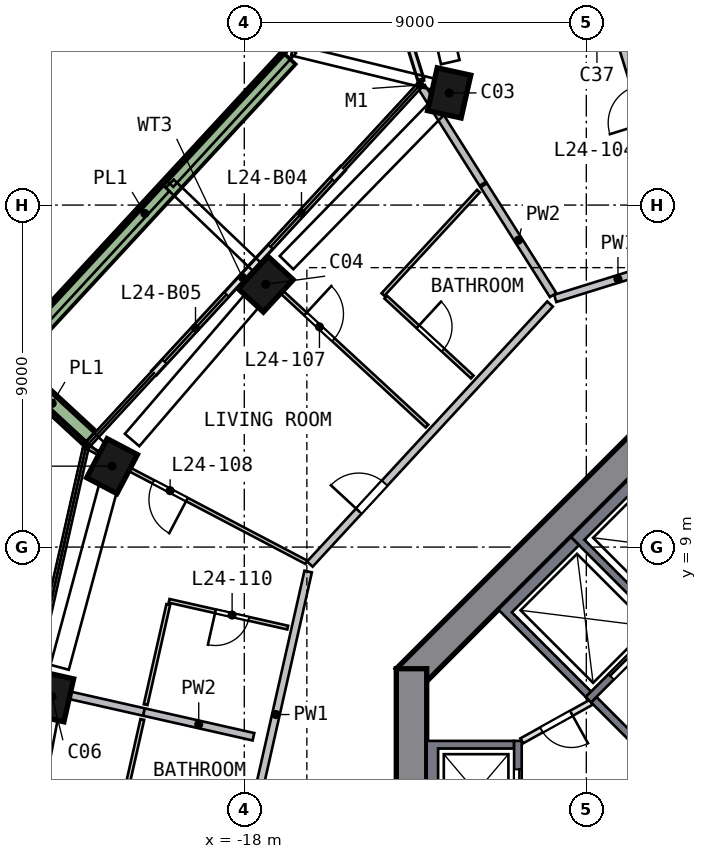
"""IFC4 building model, lengths in metres.
Left out: names, types, materials, properties, quantities, classifications, styles, units other than length and angle.
Written with IfcOpenShell. Run it as: python <this file> out.ifc"""

import sys

from ifc_helpers import new_model, si_unit, direction, frame, frame_2d, origin, origin_2d, place, context, subcontext, project, spatial, polyline, rectangle, outline, extrude, element, fill, save


model = new_model("IFC4")
c1 = context("Model", 3, precision=1e-05, world=origin(), true_north=direction((0.0, 1.0)))
c2 = subcontext(c1, "Body", "Model", "MODEL_VIEW")
j1 = project(units=[si_unit("LENGTHUNIT", "METRE"), si_unit("PLANEANGLEUNIT", "RADIAN")], contexts=[c1])
p1 = place(None, origin())
s1 = spatial("IfcSite", under=j1, at=p1, CompositionType="ELEMENT")
p2 = place(p1, origin())
s2 = spatial("IfcBuilding", under=s1, at=p2, CompositionType="ELEMENT")
p3 = place(p2, frame((0.0, 0.0, 103.5)))
s3 = spatial("IfcBuildingStorey", under=s2, at=p3, CompositionType="ELEMENT", Elevation=103.5)
p4 = place(p3, frame((-12.489, 21.024, 0.0), z_axis=(-0.099428594, -0.06020447, 0.993221716), x_axis=(0.212793811, 0.973789548, 0.080328764)))
e1 = element("IfcColumn", 1, at=p4, inside=s3, PredefinedType="COLUMN", context=c2, shape_type="SweptSolid", body=[
    extrude(rectangle(XDim=1.15, YDim=0.9, at=origin_2d()), origin(), (0.0, 0.0, 1.0), 3.212),
])
p5 = place(p3, frame((-17.344, 16.016, 0.0), z_axis=(-0.075517991, -0.083123025, 0.993673787), x_axis=(-0.674399767, -0.729776299, -0.112300969)))
e2 = element("IfcColumn", 2, at=p5, inside=s3, PredefinedType="COLUMN", context=c2, shape_type="SweptSolid", body=[
    extrude(rectangle(XDim=1.15, YDim=0.9, at=origin_2d()), origin(), (0.0, 0.0, 1.0), 3.21),
])
p6 = place(p3, frame((-21.416, 11.253, 0.0), z_axis=(-0.052686348, -0.10225561, 0.993361937), x_axis=(0.462460096, 0.879147052, 0.115026606)))
e3 = element("IfcColumn", 3, at=p6, inside=s3, PredefinedType="COLUMN", context=c2, shape_type="SweptSolid", body=[
    extrude(rectangle(XDim=1.15, YDim=0.9, at=origin_2d()), origin(), (0.0, 0.0, 1.0), 3.211),
])
p7 = place(p3, frame((-23.029, 5.198, 0.0), z_axis=(-0.023879798, -0.109740599, 0.993673365), x_axis=(-0.219512496, -0.969124304, -0.112304706)))
e4 = element("IfcColumn", 4, at=p7, inside=s3, PredefinedType="COLUMN", context=c2, shape_type="SweptSolid", body=[
    extrude(rectangle(XDim=1.15, YDim=0.9, at=origin_2d()), origin(), (0.0, 0.0, 1.0), 3.21),
])
p8 = place(p3, frame((-5.516, 13.717, 0.0), z_axis=(0.0, 0.0, 1.0), x_axis=(-0.707106781, -0.707106781, 0.0)))
e5 = element("IfcWall", 5, at=p8, inside=s3, PredefinedType="SHEAR", context=c2, shape_type="SweptSolid", body=[
    extrude(rectangle(XDim=11.598, YDim=0.8, at=frame_2d((5.799, 0.0))), origin(), (0.0, 0.0, 1.0), 3.5),
])
p9 = place(p3, frame((-13.6, 5.799, 0.0), z_axis=(0.0, 0.0, 1.0), x_axis=(0.0, -1.0, 0.0)))
e6 = element("IfcWall", 6, at=p9, inside=s3, PredefinedType="SHEAR", context=c2, shape_type="SweptSolid", body=[
    extrude(rectangle(XDim=11.598, YDim=0.8, at=frame_2d((5.799, 0.0))), origin(), (0.0, 0.0, 1.0), 3.5),
])
p10 = place(p9, frame((4.899, 0.0, 0.0)))
e7 = element("IfcOpeningElement", 7, at=p10, cuts=e6, PredefinedType="OPENING", context=c2, shape_type="SweptSolid", body=[
    extrude(rectangle(XDim=1.8, YDim=2.1, at=frame_2d((0.9, 1.05))), frame((0.0, 0.41, 0.0), z_axis=(0.0, -1.0, 0.0), x_axis=(1.0, 0.0, 0.0)), (0.0, 0.0, 1.0), 0.82),
])
p11 = place(p3, frame((-14.654, 25.477, 0.0), z_axis=(0.0, 0.0, 1.0), x_axis=(0.297009716, -0.954874457, 0.0)))
e8 = element("IfcWall", 8, at=p11, inside=s3, PredefinedType="SOLIDWALL", context=c2, shape_type="SweptSolid", body=[
    extrude(rectangle(XDim=4.352, YDim=0.15, at=frame_2d((2.176, 0.0))), origin(), (0.0, 0.0, 1.0), 2.425),
])
p12 = place(p11, frame((2.012, 0.0, 0.0)))
e9 = element("IfcOpeningElement", 9, at=p12, cuts=e8, PredefinedType="OPENING", context=c2, shape_type="SweptSolid", body=[
    extrude(rectangle(XDim=1.5, YDim=2.4, at=frame_2d((0.75, 1.2))), frame((0.0, 0.085, 0.0), z_axis=(0.0, -1.0, 0.0), x_axis=(1.0, 0.0, 0.0)), (0.0, 0.0, 1.0), 0.17),
])
p13 = place(p3, frame((-15.409, 18.959, 0.0), z_axis=(0.0, 0.0, 1.0), x_axis=(-0.67837347, -0.734717248, 0.0)))
e10 = element("IfcWall", 10, at=p13, inside=s3, PredefinedType="SOLIDWALL", context=c2, shape_type="SweptSolid", body=[
    extrude(rectangle(XDim=3.475, YDim=0.15, at=frame_2d((1.738, 0.0))), origin(), (0.0, 0.0, 1.0), 2.425),
])
p14 = place(p13, frame((0.4, 0.0, 0.0)))
e11 = element("IfcOpeningElement", 11, at=p14, cuts=e10, PredefinedType="OPENING", context=c2, shape_type="SweptSolid", body=[
    extrude(rectangle(XDim=2.4, YDim=2.4, at=frame_2d((1.2, 1.2))), frame((0.0, 0.085, 0.0), z_axis=(0.0, -1.0, 0.0), x_axis=(1.0, 0.0, 0.0)), (0.0, 0.0, 1.0), 0.17),
])
p15 = place(p3, frame((-17.767, 16.406, 0.0), z_axis=(0.0, 0.0, 1.0), x_axis=(-0.678446633, -0.734649689, 0.0)))
e12 = element("IfcWall", 12, at=p15, inside=s3, PredefinedType="SOLIDWALL", context=c2, shape_type="SweptSolid", body=[
    extrude(rectangle(XDim=3.836, YDim=0.15, at=frame_2d((1.918, 0.0))), origin(), (0.0, 0.0, 1.0), 2.425),
])
p16 = place(p15, frame((1.035, 0.0, 0.0)))
e13 = element("IfcOpeningElement", 13, at=p16, cuts=e12, PredefinedType="OPENING", context=c2, shape_type="SweptSolid", body=[
    extrude(rectangle(XDim=2.4, YDim=2.4, at=frame_2d((1.2, 1.2))), frame((0.0, 0.085, 0.0), z_axis=(0.0, -1.0, 0.0), x_axis=(1.0, 0.0, 0.0)), (0.0, 0.0, 1.0), 0.17),
])
p17 = place(p3, frame((-16.833, 21.877, 0.0), z_axis=(0.0, 0.0, 1.0), x_axis=(-0.67841738, -0.734676703, 0.0)))
e14 = element("IfcWall", 14, at=p17, inside=s3, PredefinedType="SOLIDWALL", context=c2, shape_type="SweptSolid", body=[
    extrude(rectangle(XDim=11.153, YDim=0.5, at=frame_2d((5.576, 0.0))), origin(), (0.0, 0.0, 1.0), 0.7),
])
p18 = place(p3, frame((-24.046, 13.697, 0.0), z_axis=(0.0, 0.0, 1.0), x_axis=(0.734678586, -0.678415341, 0.0)))
e15 = element("IfcWall", 15, at=p18, inside=s3, PredefinedType="SOLIDWALL", context=c2, shape_type="SweptSolid", body=[
    extrude(rectangle(XDim=2.699, YDim=0.5, at=frame_2d((1.35, 0.0))), origin(), (0.0, 0.0, 1.0), 0.7),
])
p19 = place(p3, origin())
e16 = element("IfcWall", 16, at=p19, inside=s3, PredefinedType="SOLIDWALL", context=c2, shape_type="SweptSolid", body=[
    extrude(outline(polyline([(-13.2, 3.9), (-10.9, 3.9), (-10.9, 3.7), (-12.9, 3.7), (-12.9, 1.4), (-10.9, 1.4), (-10.9, 1.2), (-13.2, 1.2), (-13.2, 3.9)])), origin(), (0.0, 0.0, 1.0), 3.19),
])
p20 = place(p3, frame((-10.8, 1.2, 0.0), z_axis=(0.0, 0.0, 1.0), x_axis=(0.0, 1.0, 0.0)))
e17 = element("IfcWall", 17, at=p20, inside=s3, PredefinedType="SOLIDWALL", context=c2, shape_type="SweptSolid", body=[
    extrude(rectangle(XDim=2.7, YDim=0.2, at=frame_2d((1.35, 0.0))), origin(), (0.0, 0.0, 1.0), 3.19),
])
p21 = place(p20, frame((0.75, 0.0, 0.0)))
e18 = element("IfcOpeningElement", 18, at=p21, cuts=e17, PredefinedType="OPENING", context=c2, shape_type="SweptSolid", body=[
    extrude(rectangle(XDim=1.2, YDim=2.1, at=frame_2d((0.6, 1.05))), frame((0.0, 0.11, 0.0), z_axis=(0.0, -1.0, 0.0), x_axis=(1.0, 0.0, 0.0)), (0.0, 0.0, 1.0), 0.22),
])
p22 = place(p3, origin())
e19 = element("IfcWall", 19, at=p22, inside=s3, PredefinedType="SOLIDWALL", context=c2, shape_type="SweptSolid", body=[
    extrude(outline(polyline([(-9.405, 9.263), (-7.354, 11.314), (-5.056, 9.016), (-5.197, 8.874), (-7.283, 10.96), (-9.051, 9.192), (-6.965, 7.106), (-7.106, 6.965), (-9.405, 9.263)])), origin(), (0.0, 0.0, 1.0), 3.19),
])
p23 = place(p3, origin())
e20 = element("IfcWall", 20, at=p23, inside=s3, PredefinedType="SOLIDWALL", context=c2, shape_type="SweptSolid", body=[
    extrude(outline(polyline([(-11.314, 7.354), (-9.405, 9.263), (-9.192, 9.051), (-10.96, 7.283), (-8.874, 5.197), (-9.016, 5.056), (-11.314, 7.354)])), origin(), (0.0, 0.0, 1.0), 3.19),
])
p24 = place(p3, frame((-7.036, 6.894, 0.0), z_axis=(0.0, 0.0, 1.0), x_axis=(-0.707106781, -0.707106781, 0.0)))
e21 = element("IfcWall", 21, at=p24, inside=s3, PredefinedType="SOLIDWALL", context=c2, shape_type="SweptSolid", body=[
    extrude(rectangle(XDim=2.7, YDim=0.2, at=frame_2d((1.35, 0.0))), origin(), (0.0, 0.0, 1.0), 3.19),
])
p25 = place(p24, frame((0.65, 0.0, 0.0)))
e22 = element("IfcOpeningElement", 22, at=p25, cuts=e21, PredefinedType="OPENING", context=c2, shape_type="SweptSolid", body=[
    extrude(rectangle(XDim=1.2, YDim=2.1, at=frame_2d((0.6, 1.05))), frame((0.0, 0.11, 0.0), z_axis=(0.0, -1.0, 0.0), x_axis=(1.0, 0.0, 0.0)), (0.0, 0.0, 1.0), 0.22),
])
p26 = place(p3, frame((-6.823, 3.005, 0.0), z_axis=(0.0, 0.0, 1.0), x_axis=(-0.707106781, 0.707106781, 0.0)))
e23 = element("IfcWall", 23, at=p26, inside=s3, PredefinedType="SOLIDWALL", context=c2, shape_type="SweptSolid", body=[
    extrude(rectangle(XDim=2.8, YDim=0.2, at=frame_2d((1.4, 0.0))), origin(), (0.0, 0.0, 1.0), 3.19),
])
p27 = place(p3, frame((-8.874, 4.914, 0.0), z_axis=(0.0, 0.0, 1.0), x_axis=(-0.874129705, -0.485692555, 0.0)))
e24 = element("IfcWall", 24, at=p27, inside=s3, PredefinedType="PARTITIONING", context=c2, shape_type="SweptSolid", body=[
    extrude(rectangle(XDim=2.089, YDim=0.15, at=frame_2d((1.044, 0.0))), origin(), (0.0, 0.0, 1.0), 3.19),
])
p28 = place(p27, frame((0.594, 0.0, 0.0)))
e25 = element("IfcOpeningElement", 25, at=p28, cuts=e24, PredefinedType="OPENING", context=c2, shape_type="SweptSolid", body=[
    extrude(rectangle(XDim=0.9, YDim=2.1, at=frame_2d((0.45, 1.05))), frame((0.0, 0.085, 0.0), z_axis=(0.0, -1.0, 0.0), x_axis=(1.0, 0.0, 0.0)), (0.0, 0.0, 1.0), 0.17),
])
p29 = place(p3, frame((-18.326, -0.536, 0.0), z_axis=(0.0, 0.0, 1.0), x_axis=(0.220190181, 0.975456962, 0.0)))
e26 = element("IfcWall", 26, at=p29, inside=s3, PredefinedType="SOLIDWALL", context=c2, shape_type="SweptSolid", body=[
    extrude(rectangle(XDim=9.116, YDim=0.2, at=frame_2d((4.558, 0.0))), origin(), (0.0, 0.0, 1.0), 3.19),
])
p30 = place(p29, frame((0.2, 0.0, 0.0)))
e27 = element("IfcOpeningElement", 27, at=p30, cuts=e26, PredefinedType="OPENING", context=c2, shape_type="SweptSolid", body=[
    extrude(rectangle(XDim=1.0, YDim=2.1, at=frame_2d((0.5, 1.05))), frame((0.0, 0.11, 0.0), z_axis=(0.0, -1.0, 0.0), x_axis=(1.0, 0.0, 0.0)), (0.0, 0.0, 1.0), 0.22),
])
p31 = place(p3, frame((-16.275, 8.552, 0.0), z_axis=(0.0, 0.0, 1.0), x_axis=(0.678430282, 0.734664789, 0.0)))
e28 = element("IfcWall", 28, at=p31, inside=s3, PredefinedType="SOLIDWALL", context=c2, shape_type="SweptSolid", body=[
    extrude(rectangle(XDim=9.317, YDim=0.2, at=frame_2d((4.658, 0.0))), origin(), (0.0, 0.0, 1.0), 3.19),
])
p32 = place(p31, frame((1.9, 0.0, 0.0)))
e29 = element("IfcOpeningElement", 29, at=p32, cuts=e28, PredefinedType="OPENING", context=c2, shape_type="SweptSolid", body=[
    extrude(rectangle(XDim=1.0, YDim=2.1, at=frame_2d((0.5, 1.05))), frame((0.0, 0.11, 0.0), z_axis=(0.0, -1.0, 0.0), x_axis=(1.0, 0.0, 0.0)), (0.0, 0.0, 1.0), 0.22),
])
p33 = place(p3, frame((-6.516, 16.571, 0.0), z_axis=(0.0, 0.0, 1.0), x_axis=(-0.954878579, -0.296996465, 0.0)))
e30 = element("IfcWall", 30, at=p33, inside=s3, PredefinedType="SOLIDWALL", context=c2, shape_type="SweptSolid", body=[
    extrude(rectangle(XDim=3.458, YDim=0.2, at=frame_2d((1.729, 0.0))), origin(), (0.0, 0.0, 1.0), 3.19),
])
p34 = place(p3, frame((-6.325, 16.63, 0.0), z_axis=(0.0, 0.0, 1.0), x_axis=(-0.297066997, 0.954856638, 0.0)))
e31 = element("IfcWall", 31, at=p34, inside=s3, PredefinedType="SOLIDWALL", context=c2, shape_type="SweptSolid", body=[
    extrude(rectangle(XDim=11.142, YDim=0.2, at=frame_2d((5.571, 0.0))), origin(), (0.0, 0.0, 1.0), 3.19),
])
p35 = place(p34, frame((3.7, 0.0, 0.0)))
e32 = element("IfcOpeningElement", 32, at=p35, cuts=e31, PredefinedType="OPENING", context=c2, shape_type="SweptSolid", body=[
    extrude(rectangle(XDim=1.0, YDim=2.1, at=frame_2d((0.5, 1.05))), frame((0.0, 0.11, 0.0), z_axis=(0.0, -1.0, 0.0), x_axis=(1.0, 0.0, 0.0)), (0.0, 0.0, 1.0), 0.22),
])
p36 = place(p3, frame((-20.639, 4.659, 0.0), z_axis=(0.0, 0.0, 1.0), x_axis=(-0.975447311, 0.220232929, 0.0)))
e33 = element("IfcWall", 33, at=p36, inside=s3, PredefinedType="SOLIDWALL", context=c2, shape_type="SweptSolid", body=[
    extrude(rectangle(XDim=2.95, YDim=0.2, at=frame_2d((1.475, 0.0))), origin(), (0.0, 0.0, 1.0), 3.19),
])
p37 = place(p3, frame((-17.759, 4.009, 0.0), z_axis=(0.0, 0.0, 1.0), x_axis=(-0.975459908, 0.220177126, 0.0)))
e34 = element("IfcWall", 34, at=p37, inside=s3, PredefinedType="SOLIDWALL", context=c2, shape_type="SweptSolid", body=[
    extrude(rectangle(XDim=2.953, YDim=0.2, at=frame_2d((1.477, 0.0))), origin(), (0.0, 0.0, 1.0), 3.19),
])
p38 = place(p3, frame((-11.724, 18.56, 0.0), z_axis=(0.0, 0.0, 1.0), x_axis=(-0.534044847, 0.84545615, 0.0)))
e35 = element("IfcWall", 35, at=p38, inside=s3, PredefinedType="SOLIDWALL", context=c2, shape_type="SweptSolid", body=[
    extrude(rectangle(XDim=3.011, YDim=0.2, at=frame_2d((1.506, 0.0))), origin(), (0.0, 0.0, 1.0), 3.19),
])
p39 = place(p3, frame((-9.874, 15.631, 0.0), z_axis=(0.0, 0.0, 1.0), x_axis=(-0.534062852, 0.845444777, 0.0)))
e36 = element("IfcWall", 36, at=p39, inside=s3, PredefinedType="SOLIDWALL", context=c2, shape_type="SweptSolid", body=[
    extrude(rectangle(XDim=3.418, YDim=0.2, at=frame_2d((1.709, 0.0))), origin(), (0.0, 0.0, 1.0), 3.19),
])
for number, where, z_axis, x_axis in (
    (37, (-21.278, 1.83, 0.0), (0.0, 0.0, 1.0), (0.22, 0.975, 0.0)),
    (38, (-20.0, 7.488, 0.0), (0.0, 0.0, 1.0), (-0.22, -0.975, 0.0)),
):
    element("IfcWall", number, at=place(p3, frame(where, z_axis=z_axis, x_axis=x_axis)), inside=s3, PredefinedType="PARTITIONING", context=c2, shape_type="SweptSolid", body=[
        extrude(rectangle(XDim=2.7, YDim=0.1, at=frame_2d((1.35, 0.0))), origin(), (0.0, 0.0, 1.0), 3.19),
    ])
p40 = place(p3, frame((-16.366, 8.6, 0.0), z_axis=(0.0, 0.0, 1.0), x_axis=(-0.885235319, 0.465143451, 0.0)))
e39 = element("IfcWall", 39, at=p40, inside=s3, PredefinedType="PARTITIONING", context=c2, shape_type="SweptSolid", body=[
    extrude(rectangle(XDim=6.476, YDim=0.1, at=frame_2d((3.238, 0.0))), origin(), (0.0, 0.0, 1.0), 3.19),
])
p41 = place(p40, frame((3.55, 0.0, 0.0)))
e40 = element("IfcOpeningElement", 40, at=p41, cuts=e39, PredefinedType="OPENING", context=c2, shape_type="SweptSolid", body=[
    extrude(rectangle(XDim=1.0, YDim=2.1, at=frame_2d((0.5, 1.05))), frame((0.0, 0.06, 0.0), z_axis=(0.0, -1.0, 0.0), x_axis=(1.0, 0.0, 0.0)), (0.0, 0.0, 1.0), 0.12),
])
p42 = place(p3, frame((-16.857, 6.881, 0.0), z_axis=(0.0, 0.0, 1.0), x_axis=(-0.975460033, 0.220176573, 0.0)))
e41 = element("IfcWall", 41, at=p42, inside=s3, PredefinedType="PARTITIONING", context=c2, shape_type="SweptSolid", body=[
    extrude(rectangle(XDim=3.2, YDim=0.1, at=frame_2d((1.6, 0.0))), origin(), (0.0, 0.0, 1.0), 3.19),
])
p43 = place(p42, frame((1.05, 0.0, 0.0)))
e42 = element("IfcOpeningElement", 42, at=p43, cuts=e41, PredefinedType="OPENING", context=c2, shape_type="SweptSolid", body=[
    extrude(rectangle(XDim=0.9, YDim=2.1, at=frame_2d((0.45, 1.05))), frame((0.0, 0.06, 0.0), z_axis=(0.0, -1.0, 0.0), x_axis=(1.0, 0.0, 0.0)), (0.0, 0.0, 1.0), 0.12),
])
p44 = place(p3, frame((-17.712, 16.355, 0.0), z_axis=(0.0, 0.0, 1.0), x_axis=(0.734672545, -0.678421883, 0.0)))
e43 = element("IfcWall", 43, at=p44, inside=s3, PredefinedType="PARTITIONING", context=c2, shape_type="SweptSolid", body=[
    extrude(rectangle(XDim=6.15, YDim=0.1, at=frame_2d((3.075, 0.0))), origin(), (0.0, 0.0, 1.0), 3.19),
])
p45 = place(p44, frame((1.8, 0.0, 0.0)))
e44 = element("IfcOpeningElement", 44, at=p45, cuts=e43, PredefinedType="OPENING", context=c2, shape_type="SweptSolid", body=[
    extrude(rectangle(XDim=1.0, YDim=2.1, at=frame_2d((0.5, 1.05))), frame((0.0, 0.06, 0.0), z_axis=(0.0, -1.0, 0.0), x_axis=(1.0, 0.0, 0.0)), (0.0, 0.0, 1.0), 0.12),
])
p46 = place(p3, frame((-14.278, 15.578, 0.0), z_axis=(0.0, 0.0, 1.0), x_axis=(0.734700779, -0.678391307, 0.0)))
e45 = element("IfcWall", 45, at=p46, inside=s3, PredefinedType="PARTITIONING", context=c2, shape_type="SweptSolid", body=[
    extrude(rectangle(XDim=3.1, YDim=0.1, at=frame_2d((1.55, 0.0))), origin(), (0.0, 0.0, 1.0), 3.19),
])
p47 = place(p46, frame((1.15, 0.0, 0.0)))
e46 = element("IfcOpeningElement", 46, at=p47, cuts=e45, PredefinedType="OPENING", context=c2, shape_type="SweptSolid", body=[
    extrude(rectangle(XDim=0.9, YDim=2.1, at=frame_2d((0.45, 1.05))), frame((0.0, 0.06, 0.0), z_axis=(0.0, -1.0, 0.0), x_axis=(1.0, 0.0, 0.0)), (0.0, 0.0, 1.0), 0.12),
])
p48 = place(p3, frame((-11.839, 18.367, 0.0), z_axis=(0.0, 0.0, 1.0), x_axis=(-0.678436129, -0.73465939, 0.0)))
e47 = element("IfcWall", 47, at=p48, inside=s3, PredefinedType="PARTITIONING", context=c2, shape_type="SweptSolid", body=[
    extrude(rectangle(XDim=3.704, YDim=0.1, at=frame_2d((1.852, 0.0))), origin(), (0.0, 0.0, 1.0), 3.19),
])
p49 = place(p14, origin())
e48 = element("IfcDoor", 48, at=p49, inside=s3, OperationType="SLIDING_TO_RIGHT", PredefinedType="DOOR", context=c2, shape_type="SweptSolid", body=[
    extrude(rectangle(XDim=2.4, YDim=2.4, at=frame_2d((1.2, 1.2))), frame((0.0, 0.025, 0.0), z_axis=(0.0, -1.0, 0.0), x_axis=(1.0, 0.0, 0.0)), (0.0, 0.0, 1.0), 0.05),
])
fill(e11, e48)
p50 = place(p16, origin())
e49 = element("IfcDoor", 49, at=p50, inside=s3, OperationType="SLIDING_TO_LEFT", PredefinedType="DOOR", context=c2, shape_type="SweptSolid", body=[
    extrude(rectangle(XDim=2.4, YDim=2.4, at=frame_2d((1.2, 1.2))), frame((0.0, 0.025, 0.0), z_axis=(0.0, -1.0, 0.0), x_axis=(1.0, 0.0, 0.0)), (0.0, 0.0, 1.0), 0.05),
])
fill(e13, e49)
p51 = place(p21, origin())
e50 = element("IfcDoor", 50, at=p51, inside=s3, OperationType="DOUBLE_DOOR_SLIDING", PredefinedType="DOOR", context=c2, shape_type="SweptSolid", body=[
    extrude(rectangle(XDim=1.2, YDim=2.1, at=frame_2d((0.6, 1.05))), frame((0.0, 0.025, 0.0), z_axis=(0.0, -1.0, 0.0), x_axis=(1.0, 0.0, 0.0)), (0.0, 0.0, 1.0), 0.05),
])
fill(e18, e50)
p52 = place(p25, origin())
e51 = element("IfcDoor", 51, at=p52, inside=s3, OperationType="DOUBLE_DOOR_SLIDING", PredefinedType="DOOR", context=c2, shape_type="SweptSolid", body=[
    extrude(rectangle(XDim=1.2, YDim=2.1, at=frame_2d((0.6, 1.05))), frame((0.0, 0.025, 0.0), z_axis=(0.0, -1.0, 0.0), x_axis=(1.0, 0.0, 0.0)), (0.0, 0.0, 1.0), 0.05),
])
fill(e22, e51)
p53 = place(p28, origin())
e52 = element("IfcDoor", 52, at=p53, inside=s3, OperationType="SINGLE_SWING_LEFT", PredefinedType="DOOR", context=c2, shape_type="SweptSolid", body=[
    extrude(rectangle(XDim=0.9, YDim=2.1, at=frame_2d((0.45, 1.05))), frame((0.0, 0.025, 0.0), z_axis=(0.0, -1.0, 0.0), x_axis=(1.0, 0.0, 0.0)), (0.0, 0.0, 1.0), 0.05),
])
fill(e25, e52)
p54 = place(p32, origin())
e53 = element("IfcDoor", 53, at=p54, inside=s3, OperationType="SINGLE_SWING_LEFT", PredefinedType="DOOR", context=c2, shape_type="SweptSolid", body=[
    extrude(rectangle(XDim=1.0, YDim=2.1, at=frame_2d((0.5, 1.05))), frame((0.0, 0.025, 0.0), z_axis=(0.0, -1.0, 0.0), x_axis=(1.0, 0.0, 0.0)), (0.0, 0.0, 1.0), 0.05),
])
fill(e29, e53)
p55 = place(p45, origin())
e54 = element("IfcDoor", 54, at=p55, inside=s3, OperationType="SINGLE_SWING_LEFT", PredefinedType="DOOR", context=c2, shape_type="SweptSolid", body=[
    extrude(rectangle(XDim=1.0, YDim=2.1, at=frame_2d((0.5, 1.05))), frame((0.0, 0.025, 0.0), z_axis=(0.0, -1.0, 0.0), x_axis=(1.0, 0.0, 0.0)), (0.0, 0.0, 1.0), 0.05),
])
fill(e44, e54)
p56 = place(p41, origin())
e55 = element("IfcDoor", 55, at=p56, inside=s3, OperationType="SINGLE_SWING_LEFT", PredefinedType="DOOR", context=c2, shape_type="SweptSolid", body=[
    extrude(rectangle(XDim=1.0, YDim=2.1, at=frame_2d((0.5, 1.05))), frame((0.0, 0.025, 0.0), z_axis=(0.0, -1.0, 0.0), x_axis=(1.0, 0.0, 0.0)), (0.0, 0.0, 1.0), 0.05),
])
fill(e40, e55)
p57 = place(p47, origin())
e56 = element("IfcDoor", 56, at=p57, inside=s3, OperationType="SINGLE_SWING_LEFT", PredefinedType="DOOR", context=c2, shape_type="SweptSolid", body=[
    extrude(rectangle(XDim=0.9, YDim=2.1, at=frame_2d((0.45, 1.05))), frame((0.0, 0.025, 0.0), z_axis=(0.0, -1.0, 0.0), x_axis=(1.0, 0.0, 0.0)), (0.0, 0.0, 1.0), 0.05),
])
fill(e46, e56)
p58 = place(p43, origin())
e57 = element("IfcDoor", 57, at=p58, inside=s3, OperationType="SINGLE_SWING_RIGHT", PredefinedType="DOOR", context=c2, shape_type="SweptSolid", body=[
    extrude(rectangle(XDim=0.9, YDim=2.1, at=frame_2d((0.45, 1.05))), frame((0.0, 0.025, 0.0), z_axis=(0.0, -1.0, 0.0), x_axis=(1.0, 0.0, 0.0)), (0.0, 0.0, 1.0), 0.05),
])
fill(e42, e57)
save(model, sys.argv[1])
